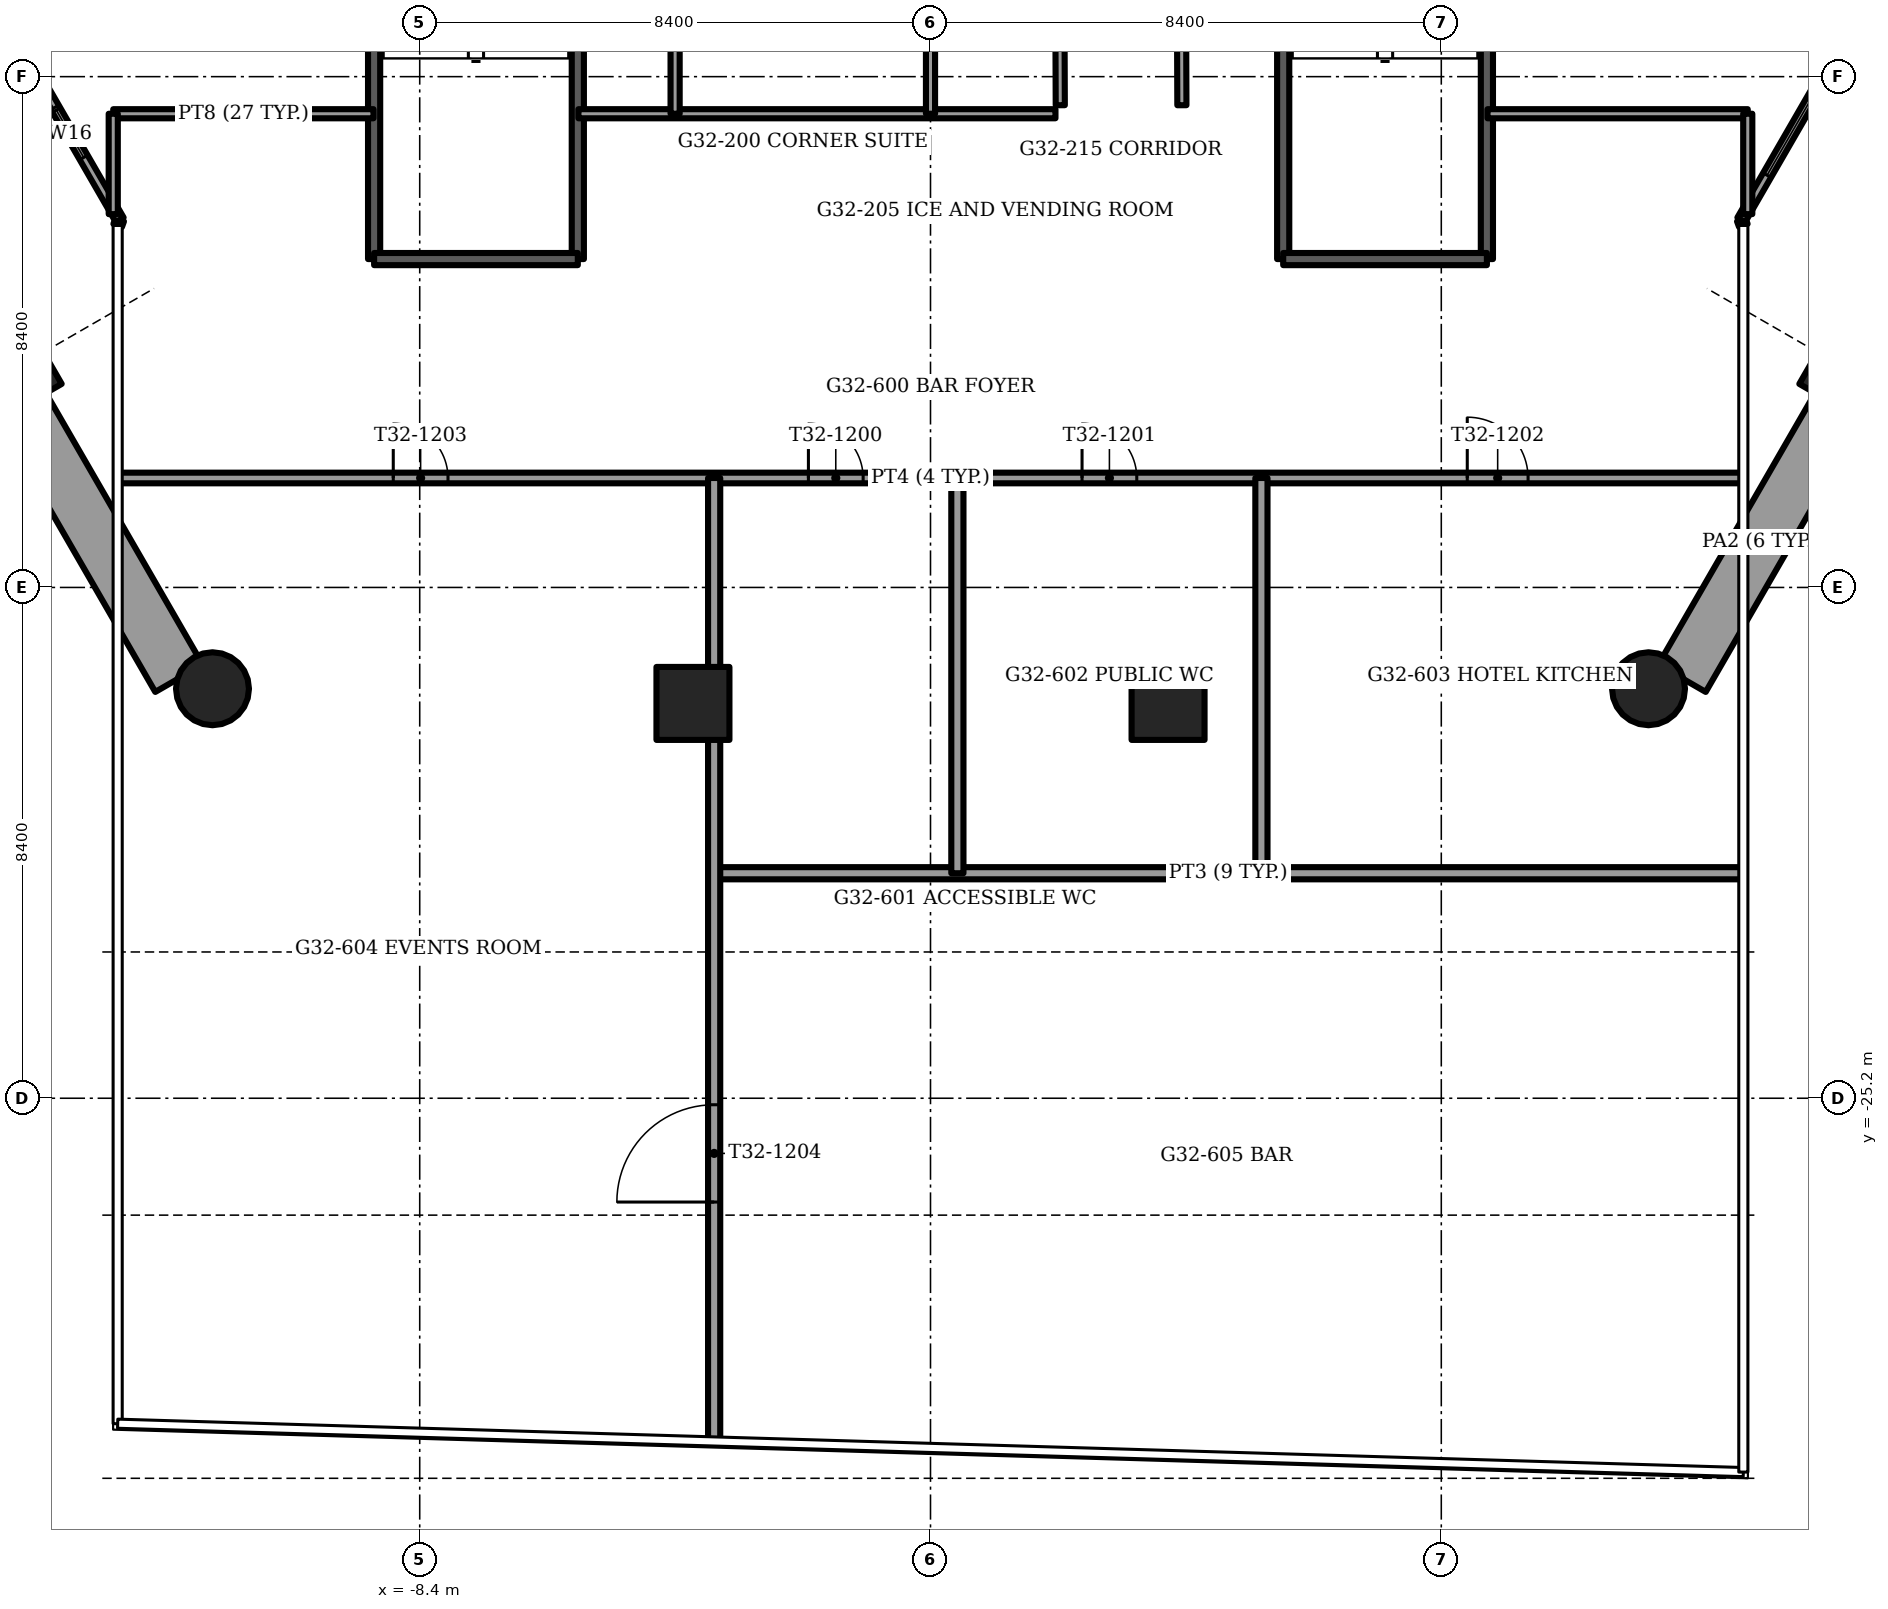
"""IFC4 building model, lengths in metres.
Left out: names, types, materials, properties, quantities, classifications, styles, units other than length and angle.
Written with IfcOpenShell. Run it as: python <this file> out.ifc"""

import sys

from ifc_helpers import new_model, si_unit, direction, frame, frame_2d, origin, origin_2d, place, context, subcontext, project, spatial, rectangle, circle, extrude, element, fill, save


model = new_model("IFC4")
c1 = context("Model", 3, precision=1e-05, world=origin(), true_north=direction((0.0, 1.0)))
c2 = subcontext(c1, "Body", "Model", "MODEL_VIEW")
j1 = project(units=[si_unit("LENGTHUNIT", "METRE"), si_unit("PLANEANGLEUNIT", "RADIAN")], contexts=[c1])
p1 = place(None, origin())
s1 = spatial("IfcSite", under=j1, at=p1, CompositionType="ELEMENT")
p2 = place(p1, origin())
s2 = spatial("IfcBuilding", under=s1, at=p2, CompositionType="ELEMENT")
p3 = place(p2, frame((0.0, 0.0, 131.0)))
s3 = spatial("IfcBuildingStorey", under=s2, at=p3, CompositionType="ELEMENT", Elevation=131.0)
for number, where, z_axis, x_axis in (
    (1, (-11.808, -18.466, -1.2), (0.0, 0.0, 1.0), (1.0, 0.0, 0.0)),
    (2, (11.808, -18.466, -1.2), (0.0, 0.0, 1.0), (1.0, 0.0, 0.0)),
):
    element("IfcColumn", number, at=place(p3, frame(where, z_axis=z_axis, x_axis=x_axis)), inside=s3, PredefinedType="COLUMN", context=c2, shape_type="SweptSolid", body=[
        extrude(circle(Radius=0.6, at=origin_2d()), origin(), (0.0, 0.0, 1.0), 3.75),
    ])
for number, where, z_axis, x_axis in (
    (3, (-15.107, -13.233, -1.2), (0.0, 0.0, 1.0), (-0.5, 0.866, 0.0)),
    (4, (-3.907, -18.707, -1.2), (0.0, 0.0, 1.0), (-1.0, 0.0, 0.0)),
    (5, (3.907, -18.707, -1.2), (0.0, 0.0, 1.0), (-1.0, 0.0, 0.0)),
    (6, (15.107, -13.233, -1.2), (0.0, 0.0, 1.0), (-0.5, -0.866, 0.0)),
):
    element("IfcColumn", number, at=place(p3, frame(where, z_axis=z_axis, x_axis=x_axis)), inside=s3, PredefinedType="COLUMN", context=c2, shape_type="SweptSolid", body=[
        extrude(rectangle(XDim=1.2, YDim=1.2, at=origin_2d()), origin(), (0.0, 0.0, 1.0), 3.75),
    ])
for number, where, z_axis, x_axis in (
    (7, (-14.952, -13.802, 0.0), (0.0, 0.0, 1.0), (0.5, -0.866, 0.0)),
    (8, (12.359, -18.294, 0.0), (0.0, 0.0, 1.0), (0.5, 0.866, 0.0)),
):
    element("IfcWall", number, at=place(p3, frame(where, z_axis=z_axis, x_axis=x_axis)), inside=s3, PredefinedType="PARAPET", context=c2, shape_type="SweptSolid", body=[
        extrude(rectangle(XDim=5.187, YDim=0.9, at=frame_2d((2.593, 0.0))), origin(), (0.0, 0.0, 1.0), 1.1),
    ])
p4 = place(p3, frame((-18.663, -1.525, 0.0), z_axis=(0.0, 0.0, 1.0), x_axis=(0.499997430087, -0.866026887519, 0.0)))
e9 = element("IfcWall", 9, at=p4, inside=s3, PredefinedType="SOLIDWALL", context=c2, shape_type="SweptSolid", body=[
    extrude(rectangle(XDim=10.657, YDim=0.15, at=frame_2d((5.329, 0.0))), origin(), (0.0, 0.0, 1.0), 3.45),
])
p5 = place(p4, frame((2.835, 0.0, 0.15)))
e10 = element("IfcOpeningElement", 10, at=p5, cuts=e9, PredefinedType="OPENING", context=c2, shape_type="SweptSolid", body=[
    extrude(rectangle(XDim=1.7, YDim=2.2, at=frame_2d((0.85, 1.1))), frame((0.0, 0.075, 0.0), z_axis=(0.0, -1.0, 0.0), x_axis=(1.0, 0.0, 0.0)), (0.0, 0.0, 1.0), 0.15),
])
p6 = place(p4, frame((8.573, 0.0, 0.15)))
e11 = element("IfcOpeningElement", 11, at=p6, cuts=e9, PredefinedType="OPENING", context=c2, shape_type="SweptSolid", body=[
    extrude(rectangle(XDim=0.9, YDim=2.2, at=frame_2d((0.45, 1.1))), frame((0.0, 0.075, 0.0), z_axis=(0.0, -1.0, 0.0), x_axis=(1.0, 0.0, 0.0)), (0.0, 0.0, 1.0), 0.15),
])
p7 = place(p4, frame((7.023, 0.0, 0.0)))
e12 = element("IfcOpeningElement", 12, at=p7, cuts=e9, PredefinedType="OPENING", context=c2, shape_type="SweptSolid", body=[
    extrude(rectangle(XDim=1.5, YDim=2.4, at=frame_2d((0.75, 1.2))), frame((0.0, 0.075, 0.0), z_axis=(0.0, -1.0, 0.0), x_axis=(1.0, 0.0, 0.0)), (0.0, 0.0, 1.0), 0.15),
])
p8 = place(p3, frame((13.334, -10.755, 0.0), z_axis=(0.0, 0.0, 1.0), x_axis=(0.499997430087, 0.866026887519, 0.0)))
e13 = element("IfcWall", 13, at=p8, inside=s3, PredefinedType="SOLIDWALL", context=c2, shape_type="SweptSolid", body=[
    extrude(rectangle(XDim=10.657, YDim=0.15, at=frame_2d((5.329, 0.0))), origin(), (0.0, 0.0, 1.0), 3.45),
])
p9 = place(p8, frame((0.847, 0.0, 0.15)))
e14 = element("IfcOpeningElement", 14, at=p9, cuts=e13, PredefinedType="OPENING", context=c2, shape_type="SweptSolid", body=[
    extrude(rectangle(XDim=1.7, YDim=2.2, at=frame_2d((0.85, 1.1))), frame((0.0, 0.075, 0.0), z_axis=(0.0, -1.0, 0.0), x_axis=(1.0, 0.0, 0.0)), (0.0, 0.0, 1.0), 0.15),
])
p10 = place(p8, frame((6.322, 0.0, 0.15)))
e15 = element("IfcOpeningElement", 15, at=p10, cuts=e13, PredefinedType="OPENING", context=c2, shape_type="SweptSolid", body=[
    extrude(rectangle(XDim=1.5, YDim=2.2, at=frame_2d((0.75, 1.1))), frame((0.0, 0.075, 0.0), z_axis=(0.0, -1.0, 0.0), x_axis=(1.0, 0.0, 0.0)), (0.0, 0.0, 1.0), 0.15),
])
for number, where, z_axis, x_axis in (
    (16, (-13.334, -10.755, 0.0), (0.0, 0.0, 1.0), (-0.338, -0.941, 0.0)),
    (17, (13.334, -10.755, 0.0), (0.0, 0.0, 1.0), (0.338, -0.941, 0.0)),
):
    element("IfcWall", number, at=place(p3, frame(where, z_axis=z_axis, x_axis=x_axis)), inside=s3, PredefinedType="SOLIDWALL", context=c2, shape_type="SweptSolid", body=[
        extrude(rectangle(XDim=0.098, YDim=0.15, at=frame_2d((0.049, 0.0))), origin(), (0.0, 0.0, 1.0), 3.45),
    ])
for number, where, z_axis, x_axis in (
    (18, (5.8, -3.7, -0.3), (0.0, 0.0, 1.0), (0.0, -1.0, 0.0)),
    (19, (9.15, -3.7, -0.3), (0.0, 0.0, 1.0), (0.0, -1.0, 0.0)),
):
    element("IfcWall", number, at=place(p3, frame(where, z_axis=z_axis, x_axis=x_axis)), inside=s3, PredefinedType="SOLIDWALL", context=c2, shape_type="SweptSolid", body=[
        extrude(rectangle(XDim=7.7, YDim=0.2, at=frame_2d((3.85, 0.0))), origin(), (0.0, 0.0, 1.0), 3.75),
    ])
p11 = place(p3, frame((5.8, -11.4, -0.3), z_axis=(0.0, 0.0, 1.0), x_axis=(1.0, 0.0, 0.0)))
e20 = element("IfcWall", 20, at=p11, inside=s3, PredefinedType="SOLIDWALL", context=c2, shape_type="SweptSolid", body=[
    extrude(rectangle(XDim=3.35, YDim=0.2, at=frame_2d((1.675, 0.0))), origin(), (0.0, 0.0, 1.0), 3.75),
])
for number, where, z_axis, x_axis in (
    (21, (-9.15, -3.7, -0.3), (0.0, 0.0, 1.0), (0.0, -1.0, 0.0)),
    (22, (-5.8, -3.7, -0.3), (0.0, 0.0, 1.0), (0.0, -1.0, 0.0)),
):
    element("IfcWall", number, at=place(p3, frame(where, z_axis=z_axis, x_axis=x_axis)), inside=s3, PredefinedType="SOLIDWALL", context=c2, shape_type="SweptSolid", body=[
        extrude(rectangle(XDim=7.7, YDim=0.2, at=frame_2d((3.85, 0.0))), origin(), (0.0, 0.0, 1.0), 3.75),
    ])
p12 = place(p3, frame((-9.15, -11.4, -0.3), z_axis=(0.0, 0.0, 1.0), x_axis=(1.0, 0.0, 0.0)))
e23 = element("IfcWall", 23, at=p12, inside=s3, PredefinedType="SOLIDWALL", context=c2, shape_type="SweptSolid", body=[
    extrude(rectangle(XDim=3.35, YDim=0.2, at=frame_2d((1.675, 0.0))), origin(), (0.0, 0.0, 1.0), 3.75),
])
p13 = place(p3, frame((-13.44, -9.01, 0.0), z_axis=(0.0, 0.0, 1.0), x_axis=(1.0, 0.0, 0.0)))
e24 = element("IfcWall", 24, at=p13, inside=s3, PredefinedType="PARTITIONING", context=c2, shape_type="SweptSolid", body=[
    extrude(rectangle(XDim=4.28, YDim=0.15, at=frame_2d((2.14, 0.0))), origin(), (0.0, 0.0, 1.0), 3.45),
])
p14 = place(p3, frame((-5.79, -9.01, 0.0), z_axis=(0.0, 0.0, 1.0), x_axis=(1.0, 0.0, 0.0)))
e25 = element("IfcWall", 25, at=p14, inside=s3, PredefinedType="PARTITIONING", context=c2, shape_type="SweptSolid", body=[
    extrude(rectangle(XDim=7.845, YDim=0.15, at=frame_2d((3.922, 0.0))), origin(), (0.0, 0.0, 1.0), 3.45),
])
p15 = place(p3, frame((9.16, -9.01, 0.0), z_axis=(0.0, 0.0, 1.0), x_axis=(1.0, 0.0, 0.0)))
e26 = element("IfcWall", 26, at=p15, inside=s3, PredefinedType="PARTITIONING", context=c2, shape_type="SweptSolid", body=[
    extrude(rectangle(XDim=4.28, YDim=0.15, at=frame_2d((2.14, 0.0))), origin(), (0.0, 0.0, 1.0), 3.45),
])
p16 = place(p3, frame((13.44, -10.661, 0.0), z_axis=(0.0, 0.0, 1.0), x_axis=(0.0, 1.0, 0.0)))
e27 = element("IfcWall", 27, at=p16, inside=s3, PredefinedType="PARTITIONING", context=c2, shape_type="SweptSolid", body=[
    extrude(rectangle(XDim=1.651, YDim=0.15, at=frame_2d((0.825, 0.0))), origin(), (0.0, 0.0, 1.0), 3.45),
])
p17 = place(p3, frame((0.0, -9.01, 0.0), z_axis=(0.0, 0.0, 1.0), x_axis=(0.0, 1.0, 0.0)))
e28 = element("IfcWall", 28, at=p17, inside=s3, PredefinedType="PARTITIONING", context=c2, shape_type="SweptSolid", body=[
    extrude(rectangle(XDim=5.31, YDim=0.15, at=frame_2d((2.655, 0.0))), origin(), (0.0, 0.0, 1.0), 3.45),
])
p18 = place(p3, frame((-4.2, -9.01, 0.0), z_axis=(0.0, 0.0, 1.0), x_axis=(0.0, 1.0, 0.0)))
e29 = element("IfcWall", 29, at=p18, inside=s3, PredefinedType="PARTITIONING", context=c2, shape_type="SweptSolid", body=[
    extrude(rectangle(XDim=5.31, YDim=0.15, at=frame_2d((2.655, 0.0))), origin(), (0.0, 0.0, 1.0), 3.45),
])
p19 = place(p18, frame((3.86, 0.0, 0.0)))
e30 = element("IfcOpeningElement", 30, at=p19, cuts=e29, PredefinedType="OPENING", context=c2, shape_type="SweptSolid", body=[
    extrude(rectangle(XDim=0.9, YDim=2.1, at=frame_2d((0.45, 1.05))), frame((0.0, 0.075, 0.0), z_axis=(0.0, -1.0, 0.0), x_axis=(1.0, 0.0, 0.0)), (0.0, 0.0, 1.0), 0.15),
])
p20 = place(p3, frame((-13.44, -10.661, 0.0), z_axis=(0.0, 0.0, 1.0), x_axis=(0.0, 1.0, 0.0)))
e31 = element("IfcWall", 31, at=p20, inside=s3, PredefinedType="PARTITIONING", context=c2, shape_type="SweptSolid", body=[
    extrude(rectangle(XDim=1.651, YDim=0.15, at=frame_2d((0.825, 0.0))), origin(), (0.0, 0.0, 1.0), 3.45),
])
p21 = place(p3, frame((4.134, -8.87, 0.0), z_axis=(0.0, 0.0, 1.0), x_axis=(-0.003683216269, 0.999993216936, 0.0)))
e32 = element("IfcWall", 32, at=p21, inside=s3, PredefinedType="PARTITIONING", context=c2, shape_type="SweptSolid", body=[
    extrude(rectangle(XDim=5.17, YDim=0.15, at=frame_2d((2.585, 0.0))), origin(), (0.0, 0.0, 1.0), 3.45),
])
p22 = place(p3, frame((2.134, -8.87, 0.0), z_axis=(0.0, 0.0, 1.0), x_axis=(-0.003686872276, 0.999993203463, 0.0)))
e33 = element("IfcWall", 33, at=p22, inside=s3, PredefinedType="PARTITIONING", context=c2, shape_type="SweptSolid", body=[
    extrude(rectangle(XDim=5.165, YDim=0.15, at=frame_2d((2.583, 0.0))), origin(), (0.0, 0.0, 1.0), 3.45),
])
p23 = place(p3, frame((-13.348, -15.0, 0.0), z_axis=(0.0, 0.0, 1.0), x_axis=(1.0, 0.0, 0.0)))
e34 = element("IfcWall", 34, at=p23, inside=s3, PredefinedType="PARTITIONING", context=c2, shape_type="SweptSolid", body=[
    extrude(rectangle(XDim=26.696, YDim=0.175, at=frame_2d((13.348, 0.0))), origin(), (0.0, 0.0, 1.0), 3.45),
])
p24 = place(p23, frame((11.34, 0.0, 0.0)))
e35 = element("IfcOpeningElement", 35, at=p24, cuts=e34, PredefinedType="OPENING", context=c2, shape_type="SweptSolid", body=[
    extrude(rectangle(XDim=0.9, YDim=2.1, at=frame_2d((0.45, 1.05))), frame((0.0, 0.087, 0.0), z_axis=(0.0, -1.0, 0.0), x_axis=(1.0, 0.0, 0.0)), (0.0, 0.0, 1.0), 0.175),
])
p25 = place(p23, frame((15.84, 0.0, 0.0)))
e36 = element("IfcOpeningElement", 36, at=p25, cuts=e34, PredefinedType="OPENING", context=c2, shape_type="SweptSolid", body=[
    extrude(rectangle(XDim=0.9, YDim=2.1, at=frame_2d((0.45, 1.05))), frame((0.0, 0.087, 0.0), z_axis=(0.0, -1.0, 0.0), x_axis=(1.0, 0.0, 0.0)), (0.0, 0.0, 1.0), 0.175),
])
p26 = place(p23, frame((22.175, 0.0, 0.0)))
e37 = element("IfcOpeningElement", 37, at=p26, cuts=e34, PredefinedType="OPENING", context=c2, shape_type="SweptSolid", body=[
    extrude(rectangle(XDim=1.0, YDim=2.1, at=frame_2d((0.5, 1.05))), frame((0.0, 0.087, 0.0), z_axis=(0.0, -1.0, 0.0), x_axis=(1.0, 0.0, 0.0)), (0.0, 0.0, 1.0), 0.175),
])
p27 = place(p23, frame((4.513, 0.0, 0.0)))
e38 = element("IfcOpeningElement", 38, at=p27, cuts=e34, PredefinedType="OPENING", context=c2, shape_type="SweptSolid", body=[
    extrude(rectangle(XDim=0.9, YDim=2.1, at=frame_2d((0.45, 1.05))), frame((0.0, 0.087, 0.0), z_axis=(0.0, -1.0, 0.0), x_axis=(1.0, 0.0, 0.0)), (0.0, 0.0, 1.0), 0.175),
])
p28 = place(p3, frame((-3.558, -21.5, 0.0), z_axis=(0.0, 0.0, 1.0), x_axis=(1.0, 0.0, 0.0)))
e39 = element("IfcWall", 39, at=p28, inside=s3, PredefinedType="PARTITIONING", context=c2, shape_type="SweptSolid", body=[
    extrude(rectangle(XDim=16.906, YDim=0.2, at=frame_2d((8.453, 0.0))), origin(), (0.0, 0.0, 1.0), 3.45),
])
p29 = place(p3, frame((-3.558, -30.825, 0.0), z_axis=(0.0, 0.0, 1.0), x_axis=(0.0, 1.0, 0.0)))
e40 = element("IfcWall", 40, at=p29, inside=s3, PredefinedType="PARTITIONING", context=c2, shape_type="SweptSolid", body=[
    extrude(rectangle(XDim=15.825, YDim=0.2, at=frame_2d((7.913, 0.0))), origin(), (0.0, 0.0, 1.0), 2.828),
])
p30 = place(p29, frame((3.918, 0.0, 0.0)))
e41 = element("IfcOpeningElement", 41, at=p30, cuts=e40, PredefinedType="OPENING", context=c2, shape_type="SweptSolid", body=[
    extrude(rectangle(XDim=1.6, YDim=2.1, at=frame_2d((0.8, 1.05))), frame((0.0, 0.1, 0.0), z_axis=(0.0, -1.0, 0.0), x_axis=(1.0, 0.0, 0.0)), (0.0, 0.0, 1.0), 0.2),
])
for number, where, z_axis, x_axis in (
    (42, (0.442, -21.5, 0.0), (0.0, 0.0, 1.0), (0.0, 1.0, 0.0)),
    (43, (5.442, -21.5, 0.0), (0.0, 0.0, 1.0), (0.0, 1.0, 0.0)),
):
    element("IfcWall", number, at=place(p3, frame(where, z_axis=z_axis, x_axis=x_axis)), inside=s3, PredefinedType="PARTITIONING", context=c2, shape_type="SweptSolid", body=[
        extrude(rectangle(XDim=6.5, YDim=0.2, at=frame_2d((3.25, 0.0))), origin(), (0.0, 0.0, 1.0), 3.45),
    ])
p31 = place(p6, origin())
e44 = element("IfcWindow", 44, at=p31, inside=s3, PartitioningType="SINGLE_PANEL", PredefinedType="WINDOW", context=c2, shape_type="SweptSolid", body=[
    extrude(rectangle(XDim=0.9, YDim=2.2, at=frame_2d((0.45, 1.1))), frame((0.0, 0.03, 0.0), z_axis=(0.0, -1.0, 0.0), x_axis=(1.0, 0.0, 0.0)), (0.0, 0.0, 1.0), 0.06),
])
fill(e11, e44)
p32 = place(p7, origin())
e45 = element("IfcDoor", 45, at=p32, inside=s3, OperationType="SLIDING_TO_RIGHT", PredefinedType="DOOR", context=c2, shape_type="SweptSolid", body=[
    extrude(rectangle(XDim=1.5, YDim=2.4, at=frame_2d((0.75, 1.2))), frame((0.0, 0.025, 0.0), z_axis=(0.0, -1.0, 0.0), x_axis=(1.0, 0.0, 0.0)), (0.0, 0.0, 1.0), 0.05),
])
fill(e12, e45)
p33 = place(p9, origin())
e46 = element("IfcWindow", 46, at=p33, inside=s3, PartitioningType="SINGLE_PANEL", PredefinedType="WINDOW", context=c2, shape_type="SweptSolid", body=[
    extrude(rectangle(XDim=1.7, YDim=2.2, at=frame_2d((0.85, 1.1))), frame((0.0, 0.03, 0.0), z_axis=(0.0, -1.0, 0.0), x_axis=(1.0, 0.0, 0.0)), (0.0, 0.0, 1.0), 0.06),
])
fill(e14, e46)
p34 = place(p24, origin())
e47 = element("IfcDoor", 47, at=p34, inside=s3, OperationType="SINGLE_SWING_RIGHT", PredefinedType="DOOR", context=c2, shape_type="SweptSolid", body=[
    extrude(rectangle(XDim=0.9, YDim=2.1, at=frame_2d((0.45, 1.05))), frame((0.0, 0.025, 0.0), z_axis=(0.0, -1.0, 0.0), x_axis=(1.0, 0.0, 0.0)), (0.0, 0.0, 1.0), 0.05),
])
fill(e35, e47)
p35 = place(p25, origin())
e48 = element("IfcDoor", 48, at=p35, inside=s3, OperationType="SINGLE_SWING_LEFT", PredefinedType="DOOR", context=c2, shape_type="SweptSolid", body=[
    extrude(rectangle(XDim=0.9, YDim=2.1, at=frame_2d((0.45, 1.05))), frame((0.0, 0.025, 0.0), z_axis=(0.0, -1.0, 0.0), x_axis=(1.0, 0.0, 0.0)), (0.0, 0.0, 1.0), 0.05),
])
fill(e36, e48)
p36 = place(p26, origin())
e49 = element("IfcDoor", 49, at=p36, inside=s3, OperationType="SINGLE_SWING_RIGHT", PredefinedType="DOOR", context=c2, shape_type="SweptSolid", body=[
    extrude(rectangle(XDim=1.0, YDim=2.1, at=frame_2d((0.5, 1.05))), frame((0.0, 0.025, 0.0), z_axis=(0.0, -1.0, 0.0), x_axis=(1.0, 0.0, 0.0)), (0.0, 0.0, 1.0), 0.05),
])
fill(e37, e49)
p37 = place(p27, origin())
e50 = element("IfcDoor", 50, at=p37, inside=s3, OperationType="SINGLE_SWING_LEFT", PredefinedType="DOOR", context=c2, shape_type="SweptSolid", body=[
    extrude(rectangle(XDim=0.9, YDim=2.1, at=frame_2d((0.45, 1.05))), frame((0.0, 0.025, 0.0), z_axis=(0.0, -1.0, 0.0), x_axis=(1.0, 0.0, 0.0)), (0.0, 0.0, 1.0), 0.05),
])
fill(e38, e50)
p38 = place(p30, origin())
e51 = element("IfcDoor", 51, at=p38, inside=s3, OperationType="DOUBLE_DOOR_SINGLE_SWING", PredefinedType="DOOR", context=c2, shape_type="SweptSolid", body=[
    extrude(rectangle(XDim=1.6, YDim=2.1, at=frame_2d((0.8, 1.05))), frame((0.0, 0.025, 0.0), z_axis=(0.0, -1.0, 0.0), x_axis=(1.0, 0.0, 0.0)), (0.0, 0.0, 1.0), 0.05),
])
fill(e41, e51)
save(model, sys.argv[1])
